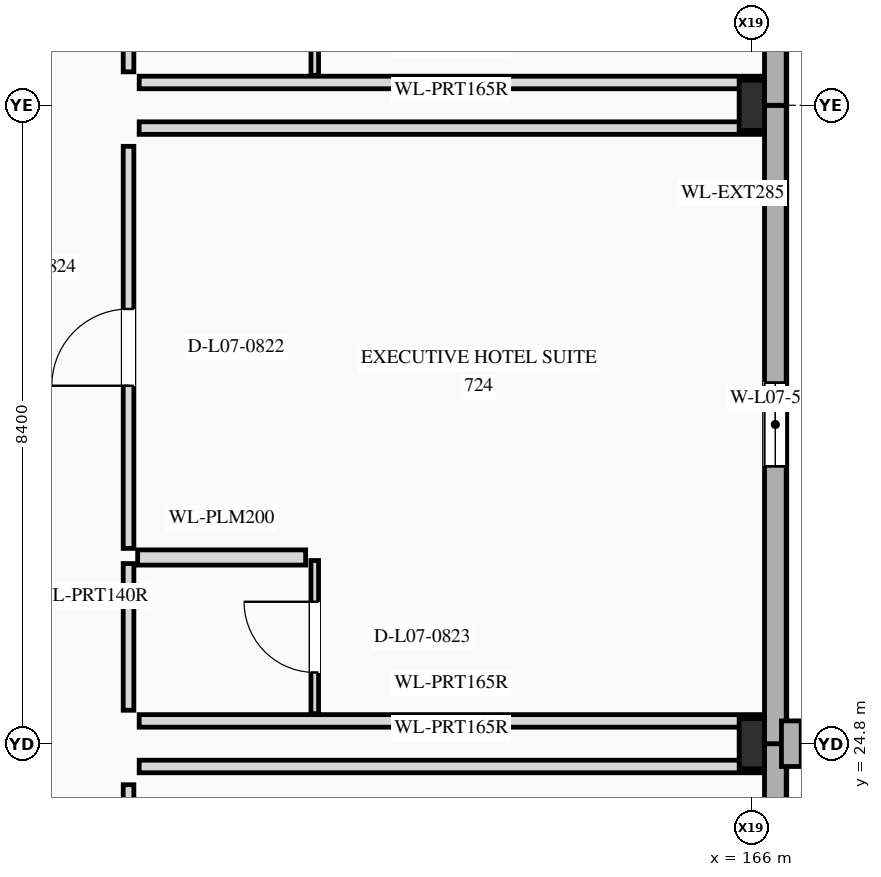
"""IFC4 building model, lengths in metres.
Left out: names, types, materials, properties, quantities, classifications, styles, units other than length and angle.
Written with IfcOpenShell. Run it as: python <this file> out.ifc"""

import sys

from ifc_helpers import new_model, si_unit, direction, frame, frame_2d, origin, origin_2d, place, context, subcontext, project, spatial, rectangle, i_section, extrude, element, fill, save


model = new_model("IFC4")
c1 = context("Model", 3, precision=1e-05, world=origin(), true_north=direction((0.0, 1.0)))
c2 = subcontext(c1, "Body", "Model", "MODEL_VIEW")
j1 = project(units=[si_unit("LENGTHUNIT", "METRE"), si_unit("PLANEANGLEUNIT", "RADIAN")], contexts=[c1])
p1 = place(None, origin())
s1 = spatial("IfcSite", under=j1, at=p1, CompositionType="ELEMENT")
p2 = place(p1, origin())
s2 = spatial("IfcBuilding", under=s1, at=p2, CompositionType="ELEMENT")
p3 = place(p2, frame((0.0, 0.0, 30.6)))
s3 = spatial("IfcBuildingStorey", under=s2, at=p3, CompositionType="ELEMENT", Elevation=30.6)
for number, where, z_axis, x_axis in (
    (1, (166.0, 24.8, 0.0), (0.0, 0.0, 1.0), (1.0, 0.0, 0.0)),
    (2, (166.0, 33.2, 0.0), (0.0, 0.0, 1.0), (1.0, 0.0, 0.0)),
):
    element("IfcColumn", number, at=place(p3, frame(where, z_axis=z_axis, x_axis=x_axis)), inside=s3, PredefinedType="COLUMN", context=c2, shape_type="SweptSolid", body=[
        extrude(i_section(OverallWidth=0.333, OverallDepth=0.66, WebThickness=0.024, FlangeThickness=0.044, at=origin_2d()), origin(), (0.0, 0.0, 1.0), 3.5),
    ])
p4 = place(p3, frame((166.31, 18.8, 0.0), z_axis=(0.0, 0.0, 1.0), x_axis=(0.0, 1.0, 0.0)))
e3 = element("IfcWall", 3, at=p4, inside=s3, PredefinedType="STANDARD", context=c2, shape_type="SweptSolid", body=[
    extrude(rectangle(XDim=6.0, YDim=0.285, at=frame_2d((3.0, 0.0))), origin(), (0.0, 0.0, 1.0), 3.5),
])
p5 = place(p4, frame((2.4, 0.0, 0.85)))
e4 = element("IfcOpeningElement", 4, at=p5, cuts=e3, PredefinedType="OPENING", context=c2, shape_type="SweptSolid", body=[
    extrude(rectangle(XDim=1.2, YDim=1.6, at=frame_2d((0.6, 0.8))), frame((0.0, 0.152, 0.0), z_axis=(0.0, -1.0, 0.0), x_axis=(1.0, 0.0, 0.0)), (0.0, 0.0, 1.0), 0.305),
])
p6 = place(p3, frame((166.31, 24.8, 0.0), z_axis=(0.0, 0.0, 1.0), x_axis=(0.0, 1.0, 0.0)))
e5 = element("IfcWall", 5, at=p6, inside=s3, PredefinedType="STANDARD", context=c2, shape_type="SweptSolid", body=[
    extrude(rectangle(XDim=8.4, YDim=0.285, at=frame_2d((4.2, 0.0))), origin(), (0.0, 0.0, 1.0), 3.5),
])
p7 = place(p6, frame((3.65, 0.0, 0.85)))
e6 = element("IfcOpeningElement", 6, at=p7, cuts=e5, PredefinedType="OPENING", context=c2, shape_type="SweptSolid", body=[
    extrude(rectangle(XDim=1.1, YDim=1.5, at=frame_2d((0.55, 0.75))), frame((0.0, 0.152, 0.0), z_axis=(0.0, -1.0, 0.0), x_axis=(1.0, 0.0, 0.0)), (0.0, 0.0, 1.0), 0.305),
])
p8 = place(p3, frame((166.52, 24.5, 0.0), z_axis=(0.0, 0.0, 1.0), x_axis=(0.0, 1.0, 0.0)))
e7 = element("IfcWall", 7, at=p8, inside=s3, PredefinedType="ELEMENTEDWALL", context=c2, shape_type="SweptSolid", body=[
    extrude(rectangle(XDim=0.6, YDim=0.26, at=frame_2d((0.3, 0.0))), origin(), (0.0, 0.0, 1.0), 3.5),
])
p9 = place(p3, frame((166.31, 33.2, 0.0), z_axis=(0.0, 0.0, 1.0), x_axis=(0.0, 1.0, 0.0)))
e8 = element("IfcWall", 8, at=p9, inside=s3, PredefinedType="STANDARD", context=c2, shape_type="SweptSolid", body=[
    extrude(rectangle(XDim=1.34, YDim=0.285, at=frame_2d((0.67, 0.0))), origin(), (0.0, 0.0, 1.0), 3.5),
])
p10 = place(p3, frame((157.8, 25.24, 0.0), z_axis=(0.0, 0.0, 1.0), x_axis=(0.0, 1.0, 0.0)))
e9 = element("IfcWall", 9, at=p10, inside=s3, PredefinedType="PARTITIONING", context=c2, shape_type="SweptSolid", body=[
    extrude(rectangle(XDim=1.93, YDim=0.14, at=frame_2d((0.965, 0.0))), origin(), (0.0, 0.0, 1.0), 2.753),
])
p11 = place(p3, frame((157.8, 27.37, 0.0), z_axis=(0.0, 0.0, 1.0), x_axis=(0.0, 1.0, 0.0)))
e10 = element("IfcWall", 10, at=p11, inside=s3, PredefinedType="PARTITIONING", context=c2, shape_type="SweptSolid", body=[
    extrude(rectangle(XDim=5.29, YDim=0.14, at=frame_2d((2.645, 0.0))), origin(), (0.0, 0.0, 1.0), 2.753),
])
p12 = place(p11, frame((2.14, 0.0, 0.0)))
e11 = element("IfcOpeningElement", 11, at=p12, cuts=e10, PredefinedType="OPENING", context=c2, shape_type="SweptSolid", body=[
    extrude(rectangle(XDim=1.01, YDim=2.35, at=frame_2d((0.505, 1.175))), frame((0.0, 0.08, 0.0), z_axis=(0.0, -1.0, 0.0), x_axis=(1.0, 0.0, 0.0)), (0.0, 0.0, 1.0), 0.16),
])
for number, where, z_axis, x_axis in (
    (12, (157.94, 25.1, 0.0), (0.0, 0.0, 1.0), (1.0, 0.0, 0.0)),
    (13, (157.94, 32.9, 0.0), (0.0, 0.0, 1.0), (1.0, 0.0, 0.0)),
):
    element("IfcWall", number, at=place(p3, frame(where, z_axis=z_axis, x_axis=x_axis)), inside=s3, PredefinedType="PARTITIONING", context=c2, shape_type="SweptSolid", body=[
        extrude(rectangle(XDim=8.213, YDim=0.165, at=frame_2d((4.106, 0.0))), origin(), (0.0, 0.0, 1.0), 2.59),
    ])
p13 = place(p3, frame((157.92, 27.25, 0.0), z_axis=(0.0, 0.0, 1.0), x_axis=(1.0, 0.0, 0.0)))
e14 = element("IfcWall", 14, at=p13, inside=s3, PredefinedType="PLUMBINGWALL", context=c2, shape_type="SweptSolid", body=[
    extrude(rectangle(XDim=2.21, YDim=0.2, at=frame_2d((1.105, 0.0))), origin(), (0.0, 0.0, 1.0), 3.2),
])
p14 = place(p3, frame((160.25, 25.195, 0.0), z_axis=(0.0, 0.0, 1.0), x_axis=(0.0, 1.0, 0.0)))
e15 = element("IfcWall", 15, at=p14, inside=s3, PredefinedType="PARTITIONING", context=c2, shape_type="SweptSolid", body=[
    extrude(rectangle(XDim=2.015, YDim=0.1, at=frame_2d((1.008, 0.0))), origin(), (0.0, 0.0, 1.0), 2.753),
])
p15 = place(p14, frame((0.543, 0.0, 0.0)))
e16 = element("IfcOpeningElement", 16, at=p15, cuts=e15, PredefinedType="OPENING", context=c2, shape_type="SweptSolid", body=[
    extrude(rectangle(XDim=0.93, YDim=2.22, at=frame_2d((0.465, 1.11))), frame((0.0, 0.06, 0.0), z_axis=(0.0, -1.0, 0.0), x_axis=(1.0, 0.0, 0.0)), (0.0, 0.0, 1.0), 0.12),
])
p16 = place(p3, frame((157.8, 33.64, 0.0), z_axis=(0.0, 0.0, 1.0), x_axis=(0.0, 1.0, 0.0)))
e17 = element("IfcWall", 17, at=p16, inside=s3, PredefinedType="PARTITIONING", context=c2, shape_type="SweptSolid", body=[
    extrude(rectangle(XDim=1.93, YDim=0.14, at=frame_2d((0.965, 0.0))), origin(), (0.0, 0.0, 1.0), 3.2),
])
p17 = place(p3, frame((157.94, 33.5, 0.0), z_axis=(0.0, 0.0, 1.0), x_axis=(1.0, 0.0, 0.0)))
e18 = element("IfcWall", 18, at=p17, inside=s3, PredefinedType="PARTITIONING", context=c2, shape_type="SweptSolid", body=[
    extrude(rectangle(XDim=8.213, YDim=0.165, at=frame_2d((4.106, 0.0))), origin(), (0.0, 0.0, 1.0), 2.59),
])
p18 = place(p3, frame((160.25, 33.594, 0.0), z_axis=(0.0, 0.0, 1.0), x_axis=(0.0, 1.0, 0.0)))
e19 = element("IfcWall", 19, at=p18, inside=s3, PredefinedType="PARTITIONING", context=c2, shape_type="SweptSolid", body=[
    extrude(rectangle(XDim=2.016, YDim=0.1, at=frame_2d((1.008, 0.0))), origin(), (0.0, 0.0, 1.0), 3.2),
])
p19 = place(p18, frame((0.568, 0.0, 0.0)))
e20 = element("IfcOpeningElement", 20, at=p19, cuts=e19, PredefinedType="OPENING", context=c2, shape_type="SweptSolid", body=[
    extrude(rectangle(XDim=0.88, YDim=2.1, at=frame_2d((0.44, 1.05))), frame((0.0, 0.06, 0.0), z_axis=(0.0, -1.0, 0.0), x_axis=(1.0, 0.0, 0.0)), (0.0, 0.0, 1.0), 0.12),
])
p20 = place(p3, frame((157.8, 19.34, 0.0), z_axis=(0.0, 0.0, 1.0), x_axis=(0.0, 1.0, 0.0)))
e21 = element("IfcWall", 21, at=p20, inside=s3, PredefinedType="PARTITIONING", context=c2, shape_type="SweptSolid", body=[
    extrude(rectangle(XDim=4.92, YDim=0.14, at=frame_2d((2.46, 0.0))), origin(), (0.0, 0.0, 1.0), 2.758),
])
p21 = place(p20, frame((1.985, 0.0, 0.0)))
e22 = element("IfcOpeningElement", 22, at=p21, cuts=e21, PredefinedType="OPENING", context=c2, shape_type="SweptSolid", body=[
    extrude(rectangle(XDim=0.95, YDim=2.3, at=frame_2d((0.475, 1.15))), frame((0.0, 0.08, 0.0), z_axis=(0.0, -1.0, 0.0), x_axis=(1.0, 0.0, 0.0)), (0.0, 0.0, 1.0), 0.16),
])
p22 = place(p3, frame((157.94, 24.5, 0.0), z_axis=(0.0, 0.0, 1.0), x_axis=(1.0, 0.0, 0.0)))
e23 = element("IfcWall", 23, at=p22, inside=s3, PredefinedType="PARTITIONING", context=c2, shape_type="SweptSolid", body=[
    extrude(rectangle(XDim=8.213, YDim=0.165, at=frame_2d((4.106, 0.0))), origin(), (0.0, 0.0, 1.0), 2.59),
])
p23 = place(p7, origin())
e24 = element("IfcWindow", 24, at=p23, inside=s3, PartitioningType="SINGLE_PANEL", PredefinedType="WINDOW", context=c2, shape_type="SweptSolid", body=[
    extrude(rectangle(XDim=1.1, YDim=1.5, at=frame_2d((0.55, 0.75))), frame((0.0, 0.03, 0.0), z_axis=(0.0, -1.0, 0.0), x_axis=(1.0, 0.0, 0.0)), (0.0, 0.0, 1.0), 0.06),
])
fill(e6, e24)
p24 = place(p12, origin())
e25 = element("IfcDoor", 25, at=p24, inside=s3, OperationType="SINGLE_SWING_LEFT", PredefinedType="DOOR", context=c2, shape_type="SweptSolid", body=[
    extrude(rectangle(XDim=1.01, YDim=2.35, at=frame_2d((0.505, 1.175))), frame((0.0, 0.025, 0.0), z_axis=(0.0, -1.0, 0.0), x_axis=(1.0, 0.0, 0.0)), (0.0, 0.0, 1.0), 0.05),
])
fill(e11, e25)
p25 = place(p15, origin())
e26 = element("IfcDoor", 26, at=p25, inside=s3, OperationType="SINGLE_SWING_RIGHT", PredefinedType="DOOR", context=c2, shape_type="SweptSolid", body=[
    extrude(rectangle(XDim=0.93, YDim=2.22, at=frame_2d((0.465, 1.11))), frame((0.0, 0.025, 0.0), z_axis=(0.0, -1.0, 0.0), x_axis=(1.0, 0.0, 0.0)), (0.0, 0.0, 1.0), 0.05),
])
fill(e16, e26)
save(model, sys.argv[1])
